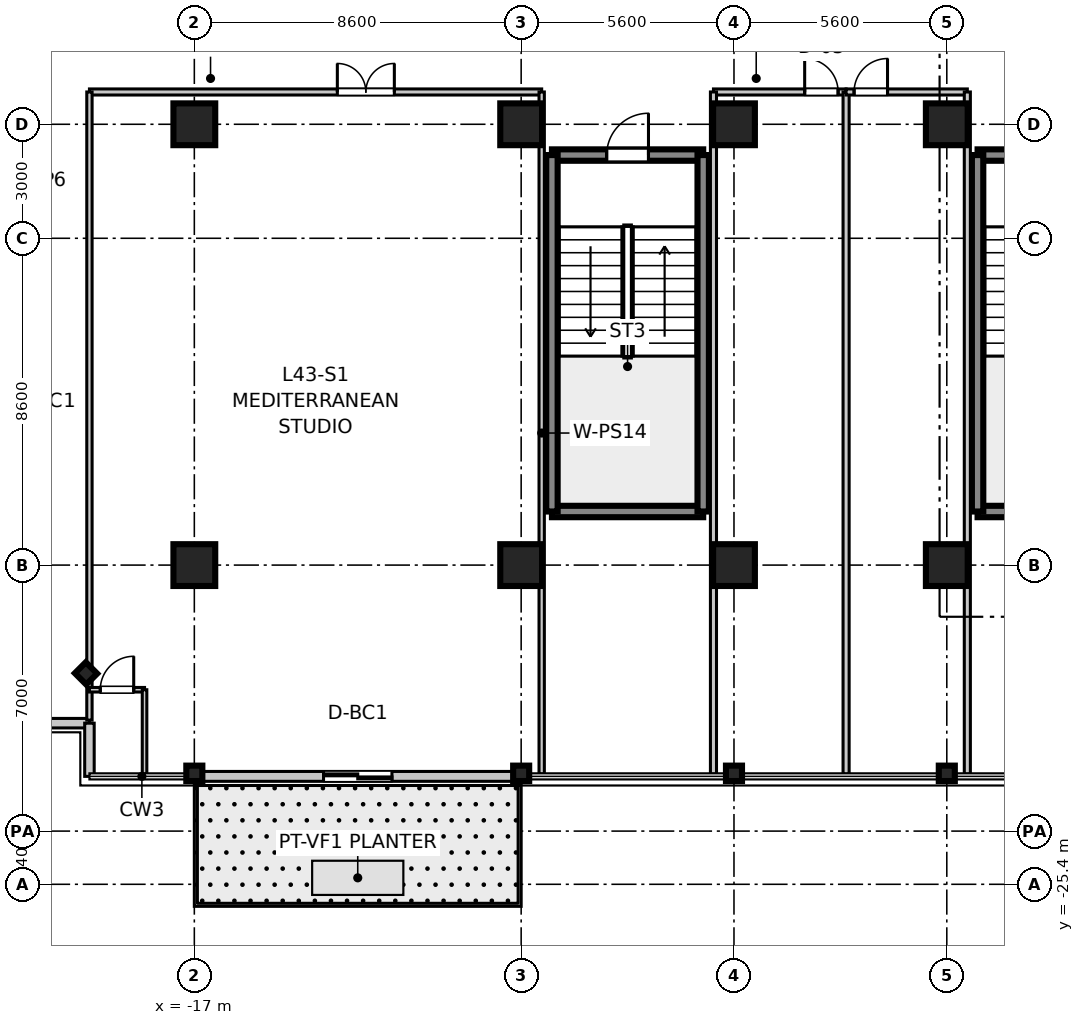
"""IFC4 building model, lengths in metres.
Left out: names, types, materials, properties, quantities, classifications, styles, units other than length and angle.
Written with IfcOpenShell. Run it as: python <this file> out.ifc"""

import sys

from ifc_helpers import new_model, si_unit, direction, frame, frame_2d, origin, origin_2d, place, context, subcontext, project, spatial, rectangle, i_section, extrude, source, transform, mapped, element, fill, save


model = new_model("IFC4")
c1 = context("Model", 3, precision=1e-05, world=origin(), true_north=direction((0.0, 1.0)))
c2 = subcontext(c1, "Body", "Model", "MODEL_VIEW")
j1 = project(units=[si_unit("LENGTHUNIT", "METRE"), si_unit("PLANEANGLEUNIT", "RADIAN")], contexts=[c1])
p1 = place(None, origin())
s1 = spatial("IfcSite", under=j1, at=p1, CompositionType="ELEMENT")
p2 = place(p1, origin())
s2 = spatial("IfcBuilding", under=s1, at=p2, CompositionType="ELEMENT")
p3 = place(p2, frame((0.0, 0.0, 170.9)))
s3 = spatial("IfcBuildingStorey", under=s2, at=p3, CompositionType="ELEMENT", Elevation=170.9)
m1 = source(origin(), c2, "Body", "SweptSolid", [
    extrude(rectangle(XDim=1.1, YDim=1.1, at=origin_2d()), origin(), (0.0, 0.0, 1.0), 3.605),
])
for number, where, z_axis, x_axis in (
    (1, (-17.0, -17.0, 0.0), (0.0, 0.0, 1.0), (1.0, 0.0, 0.0)),
    (2, (-17.0, -5.4, 0.0), (0.0, 0.0, 1.0), (1.0, 0.0, 0.0)),
    (3, (-8.4, -17.0, 0.0), (0.0, 0.0, 1.0), (1.0, 0.0, 0.0)),
    (4, (-8.4, -5.4, 0.0), (0.0, 0.0, 1.0), (1.0, 0.0, 0.0)),
    (5, (-2.8, -17.0, 0.0), (0.0, 0.0, 1.0), (1.0, 0.0, 0.0)),
    (6, (-2.8, -5.4, 0.0), (0.0, 0.0, 1.0), (1.0, 0.0, 0.0)),
    (7, (2.8, -17.0, 0.0), (0.0, 0.0, 1.0), (1.0, 0.0, 0.0)),
    (8, (2.8, -5.4, 0.0), (0.0, 0.0, 1.0), (1.0, 0.0, 0.0)),
):
    element("IfcColumn", number, at=place(p3, frame(where, z_axis=z_axis, x_axis=x_axis)), inside=s3, PredefinedType="COLUMN", context=c2, shape_type="MappedRepresentation", body=[
        mapped(m1, transform((0.0, 0.0, 0.0), scale=1.0)),
    ])
m2 = source(origin(), c2, "Body", "SweptSolid", [
    extrude(i_section(OverallWidth=0.406, OverallDepth=0.422, WebThickness=0.019, FlangeThickness=0.03, at=origin_2d()), origin(), (0.0, 0.0, 1.0), 3.605),
])
for number, where, z_axis, x_axis in (
    (9, (-17.0, -22.48, 0.0), (0.0, 0.0, 1.0), (0.0, 1.0, 0.0)),
    (10, (-8.4, -22.48, 0.0), (0.0, 0.0, 1.0), (0.0, 1.0, 0.0)),
    (11, (-2.8, -22.48, 0.0), (0.0, 0.0, 1.0), (0.0, 1.0, 0.0)),
    (12, (2.8, -22.48, 0.0), (0.0, 0.0, 1.0), (0.0, 1.0, 0.0)),
    (13, (-19.85, -19.85, 0.0), (0.0, 0.0, 1.0), (0.707, 0.707, 0.0)),
):
    element("IfcColumn", number, at=place(p3, frame(where, z_axis=z_axis, x_axis=x_axis)), inside=s3, PredefinedType="COLUMN", context=c2, shape_type="MappedRepresentation", body=[
        mapped(m2, transform((0.0, 0.0, 0.0), scale=1.0)),
    ])
m3 = source(origin(), c2, "Body", "SweptSolid", [
    extrude(rectangle(XDim=3.98, YDim=0.3, at=frame_2d((1.99, 0.0))), origin(), (0.0, 0.0, 1.0), 3.39),
])
for number, where, z_axis, x_axis in (
    (14, (3.61, -15.59, 0.0), (0.0, 0.0, 1.0), (1.0, 0.0, 0.0)),
    (15, (3.61, -6.21, 0.0), (0.0, 0.0, 1.0), (1.0, 0.0, 0.0)),
):
    element("IfcWall", number, at=place(p3, frame(where, z_axis=z_axis, x_axis=x_axis)), inside=s3, PredefinedType="SHEAR", context=c2, shape_type="MappedRepresentation", body=[
        mapped(m3, transform((0.0, 0.0, 0.0), scale=1.0)),
    ])
m4 = source(origin(), c2, "Body", "SweptSolid", [
    extrude(rectangle(XDim=9.38, YDim=0.3, at=frame_2d((4.69, 0.0))), origin(), (0.0, 0.0, 1.0), 3.39),
])
p4 = place(p3, frame((3.61, -15.59, 0.0), z_axis=(0.0, 0.0, 1.0), x_axis=(0.0, 1.0, 0.0)))
e16 = element("IfcWall", 16, at=p4, inside=s3, PredefinedType="SHEAR", context=c2, shape_type="MappedRepresentation", body=[
    mapped(m4, transform((0.0, 0.0, 0.0), scale=1.0)),
])
p5 = place(p3, frame((-7.59, -15.59, 0.0), z_axis=(0.0, 0.0, 1.0), x_axis=(1.0, 0.0, 0.0)))
e17 = element("IfcWall", 17, at=p5, inside=s3, PredefinedType="SHEAR", context=c2, shape_type="MappedRepresentation", body=[
    mapped(m3, transform((0.0, 0.0, 0.0), scale=1.0)),
])
p6 = place(p3, frame((-7.59, -6.21, 0.0), z_axis=(0.0, 0.0, 1.0), x_axis=(1.0, 0.0, 0.0)))
e18 = element("IfcWall", 18, at=p6, inside=s3, PredefinedType="SHEAR", context=c2, shape_type="MappedRepresentation", body=[
    mapped(m3, transform((0.0, 0.0, 0.0), scale=1.0)),
])
p7 = place(p6, frame((1.44, 0.0, 0.0)))
e19 = element("IfcOpeningElement", 19, at=p7, cuts=e18, PredefinedType="OPENING", context=c2, shape_type="SweptSolid", body=[
    extrude(rectangle(XDim=1.1, YDim=2.15, at=frame_2d((0.55, 1.075))), frame((0.0, 0.16, 0.0), z_axis=(0.0, -1.0, 0.0), x_axis=(1.0, 0.0, 0.0)), (0.0, 0.0, 1.0), 0.32),
])
for number, where, z_axis, x_axis in (
    (20, (-7.59, -15.59, 0.0), (0.0, 0.0, 1.0), (0.0, 1.0, 0.0)),
    (21, (-3.61, -15.59, 0.0), (0.0, 0.0, 1.0), (0.0, 1.0, 0.0)),
):
    element("IfcWall", number, at=place(p3, frame(where, z_axis=z_axis, x_axis=x_axis)), inside=s3, PredefinedType="SHEAR", context=c2, shape_type="MappedRepresentation", body=[
        mapped(m4, transform((0.0, 0.0, 0.0), scale=1.0)),
    ])
m5 = source(origin(), c2, "Body", "SweptSolid", [
    extrude(rectangle(XDim=1.4, YDim=0.25, at=frame_2d((0.7, 0.0))), origin(), (0.0, 0.0, 1.0), 3.39),
])
p8 = place(p3, frame((-21.16, -21.16, 0.0), z_axis=(0.0, 0.0, 1.0), x_axis=(1.0, 0.0, 0.0)))
e22 = element("IfcWall", 22, at=p8, inside=s3, PredefinedType="STANDARD", context=c2, shape_type="MappedRepresentation", body=[
    mapped(m5, transform((0.0, 0.0, 0.0), scale=1.0)),
])
m6 = source(origin(), c2, "Body", "SweptSolid", [
    extrude(rectangle(XDim=1.4, YDim=0.25, at=frame_2d((0.7, 0.0))), origin(), (0.0, 0.0, 1.0), 3.39),
])
p9 = place(p3, frame((-19.76, -22.56, 0.0), z_axis=(0.0, 0.0, 1.0), x_axis=(0.0, 1.0, 0.0)))
e23 = element("IfcWall", 23, at=p9, inside=s3, PredefinedType="STANDARD", context=c2, shape_type="MappedRepresentation", body=[
    mapped(m6, transform((0.0, 0.0, 0.0), scale=1.0)),
])
m7 = source(origin(), c2, "Body", "SweptSolid", [
    extrude(rectangle(XDim=8.6, YDim=0.26, at=frame_2d((4.3, 0.0))), origin(), (0.0, 0.0, 1.0), 2.87),
])
p10 = place(p3, frame((-17.0, -22.56, 0.0), z_axis=(0.0, 0.0, 1.0), x_axis=(1.0, 0.0, 0.0)))
e24 = element("IfcWall", 24, at=p10, inside=s3, PredefinedType="STANDARD", context=c2, shape_type="MappedRepresentation", body=[
    mapped(m7, transform((0.0, 0.0, 0.0), scale=1.0)),
])
p11 = place(p10, frame((3.4, 0.0, 0.0)))
e25 = element("IfcOpeningElement", 25, at=p11, cuts=e24, PredefinedType="OPENING", context=c2, shape_type="SweptSolid", body=[
    extrude(rectangle(XDim=1.8, YDim=2.25, at=frame_2d((0.9, 1.125))), frame((0.0, 0.14, 0.0), z_axis=(0.0, -1.0, 0.0), x_axis=(1.0, 0.0, 0.0)), (0.0, 0.0, 1.0), 0.28),
])
m8 = source(origin(), c2, "Body", "SweptSolid", [
    extrude(rectangle(XDim=11.9, YDim=0.16, at=frame_2d((5.95, 0.0))), origin(), (0.0, 0.0, 1.0), 2.73),
])
p12 = place(p3, frame((-19.76, -4.55, 0.0), z_axis=(0.0, 0.0, 1.0), x_axis=(1.0, 0.0, 0.0)))
e26 = element("IfcWall", 26, at=p12, inside=s3, PredefinedType="PARTITIONING", context=c2, shape_type="MappedRepresentation", body=[
    mapped(m8, transform((0.0, 0.0, 0.0), scale=1.0)),
])
p13 = place(p12, frame((6.523, 0.0, 0.0)))
e27 = element("IfcOpeningElement", 27, at=p13, cuts=e26, PredefinedType="OPENING", context=c2, shape_type="SweptSolid", body=[
    extrude(rectangle(XDim=1.5, YDim=2.15, at=frame_2d((0.75, 1.075))), frame((0.0, 0.09, 0.0), z_axis=(0.0, -1.0, 0.0), x_axis=(1.0, 0.0, 0.0)), (0.0, 0.0, 1.0), 0.18),
])
m9 = source(origin(), c2, "Body", "SweptSolid", [
    extrude(rectangle(XDim=16.53, YDim=0.14, at=frame_2d((8.265, 0.0))), origin(), (0.0, 0.0, 1.0), 2.73),
])
p14 = place(p3, frame((-19.76, -21.08, 0.0), z_axis=(0.0, 0.0, 1.0), x_axis=(0.0, 1.0, 0.0)))
e28 = element("IfcWall", 28, at=p14, inside=s3, PredefinedType="PARTITIONING", context=c2, shape_type="MappedRepresentation", body=[
    mapped(m9, transform((0.0, 0.0, 0.0), scale=1.0)),
])
m10 = source(origin(), c2, "Body", "SweptSolid", [
    extrude(rectangle(XDim=17.95, YDim=0.14, at=frame_2d((8.975, 0.0))), origin(), (0.0, 0.0, 1.0), 2.73),
])
p15 = place(p3, frame((-7.86, -22.5, 0.0), z_axis=(0.0, 0.0, 1.0), x_axis=(0.0, 1.0, 0.0)))
e29 = element("IfcWall", 29, at=p15, inside=s3, PredefinedType="PARTITIONING", context=c2, shape_type="MappedRepresentation", body=[
    mapped(m10, transform((0.0, 0.0, 0.0), scale=1.0)),
])
m11 = source(origin(), c2, "Body", "SweptSolid", [
    extrude(rectangle(XDim=1.45, YDim=0.12, at=frame_2d((0.725, 0.0))), origin(), (0.0, 0.0, 1.0), 2.73),
])
p16 = place(p3, frame((-19.76, -20.28, 0.0), z_axis=(0.0, 0.0, 1.0), x_axis=(1.0, 0.0, 0.0)))
e30 = element("IfcWall", 30, at=p16, inside=s3, PredefinedType="PARTITIONING", context=c2, shape_type="MappedRepresentation", body=[
    mapped(m11, transform((0.0, 0.0, 0.0), scale=1.0)),
])
p17 = place(p16, frame((0.285, 0.0, 0.0)))
e31 = element("IfcOpeningElement", 31, at=p17, cuts=e30, PredefinedType="OPENING", context=c2, shape_type="SweptSolid", body=[
    extrude(rectangle(XDim=0.88, YDim=2.1, at=frame_2d((0.44, 1.05))), frame((0.0, 0.07, 0.0), z_axis=(0.0, -1.0, 0.0), x_axis=(1.0, 0.0, 0.0)), (0.0, 0.0, 1.0), 0.14),
])
m12 = source(origin(), c2, "Body", "SweptSolid", [
    extrude(rectangle(XDim=2.22, YDim=0.12, at=frame_2d((1.11, 0.0))), origin(), (0.0, 0.0, 1.0), 2.73),
])
p18 = place(p3, frame((-18.31, -22.5, 0.0), z_axis=(0.0, 0.0, 1.0), x_axis=(0.0, 1.0, 0.0)))
e32 = element("IfcWall", 32, at=p18, inside=s3, PredefinedType="PARTITIONING", context=c2, shape_type="MappedRepresentation", body=[
    mapped(m12, transform((0.0, 0.0, 0.0), scale=1.0)),
])
m13 = source(origin(), c2, "Body", "SweptSolid", [
    extrude(rectangle(XDim=3.49, YDim=0.16, at=frame_2d((1.745, 0.0))), origin(), (0.0, 0.0, 1.0), 2.73),
])
p19 = place(p3, frame((-3.34, -4.55, 0.0), z_axis=(0.0, 0.0, 1.0), x_axis=(1.0, 0.0, 0.0)))
e33 = element("IfcWall", 33, at=p19, inside=s3, PredefinedType="PARTITIONING", context=c2, shape_type="MappedRepresentation", body=[
    mapped(m13, transform((0.0, 0.0, 0.0), scale=1.0)),
])
p20 = place(p19, frame((2.4, 0.0, 0.0)))
e34 = element("IfcOpeningElement", 34, at=p20, cuts=e33, PredefinedType="OPENING", context=c2, shape_type="SweptSolid", body=[
    extrude(rectangle(XDim=0.88, YDim=2.1, at=frame_2d((0.44, 1.05))), frame((0.0, 0.09, 0.0), z_axis=(0.0, -1.0, 0.0), x_axis=(1.0, 0.0, 0.0)), (0.0, 0.0, 1.0), 0.18),
])
m14 = source(origin(), c2, "Body", "SweptSolid", [
    extrude(rectangle(XDim=17.95, YDim=0.16, at=frame_2d((8.975, 0.0))), origin(), (0.0, 0.0, 1.0), 2.73),
])
for number, where, z_axis, x_axis in (
    (35, (-3.34, -22.5, 0.0), (0.0, 0.0, 1.0), (0.0, 1.0, 0.0)),
    (36, (0.15, -22.5, 0.0), (0.0, 0.0, 1.0), (0.0, 1.0, 0.0)),
):
    element("IfcWall", number, at=place(p3, frame(where, z_axis=z_axis, x_axis=x_axis)), inside=s3, PredefinedType="PARTITIONING", context=c2, shape_type="MappedRepresentation", body=[
        mapped(m14, transform((0.0, 0.0, 0.0), scale=1.0)),
    ])
m15 = source(origin(), c2, "Body", "SweptSolid", [
    extrude(rectangle(XDim=3.19, YDim=0.16, at=frame_2d((1.595, 0.0))), origin(), (0.0, 0.0, 1.0), 2.73),
])
p21 = place(p3, frame((0.15, -4.55, 0.0), z_axis=(0.0, 0.0, 1.0), x_axis=(1.0, 0.0, 0.0)))
e37 = element("IfcWall", 37, at=p21, inside=s3, PredefinedType="PARTITIONING", context=c2, shape_type="MappedRepresentation", body=[
    mapped(m15, transform((0.0, 0.0, 0.0), scale=1.0)),
])
p22 = place(p21, frame((0.21, 0.0, 0.0)))
e38 = element("IfcOpeningElement", 38, at=p22, cuts=e37, PredefinedType="OPENING", context=c2, shape_type="SweptSolid", body=[
    extrude(rectangle(XDim=0.88, YDim=2.1, at=frame_2d((0.44, 1.05))), frame((0.0, 0.09, 0.0), z_axis=(0.0, -1.0, 0.0), x_axis=(1.0, 0.0, 0.0)), (0.0, 0.0, 1.0), 0.18),
])
p23 = place(p3, frame((3.34, -22.5, 0.0), z_axis=(0.0, 0.0, 1.0), x_axis=(0.0, 1.0, 0.0)))
e39 = element("IfcWall", 39, at=p23, inside=s3, PredefinedType="PARTITIONING", context=c2, shape_type="MappedRepresentation", body=[
    mapped(m14, transform((0.0, 0.0, 0.0), scale=1.0)),
])
m16 = source(origin(), c2, "Body", "SweptSolid", [
    extrude(rectangle(XDim=1.1, YDim=2.15, at=frame_2d((0.55, 1.075))), frame((0.0, 0.025, 0.0), z_axis=(0.0, -1.0, 0.0), x_axis=(1.0, 0.0, 0.0)), (0.0, 0.0, 1.0), 0.05),
])
p24 = place(p7, frame((1.1, 0.0, 0.0), z_axis=(0.0, 0.0, 1.0), x_axis=(-1.0, 0.0, 0.0)))
e40 = element("IfcDoor", 40, at=p24, inside=s3, OperationType="SINGLE_SWING_RIGHT", PredefinedType="DOOR", context=c2, shape_type="MappedRepresentation", body=[
    mapped(m16, transform((0.0, 0.0, 0.0), scale=1.0)),
])
fill(e19, e40)
m17 = source(origin(), c2, "Body", "SweptSolid", [
    extrude(rectangle(XDim=0.88, YDim=2.1, at=frame_2d((0.44, 1.05))), frame((0.0, 0.025, 0.0), z_axis=(0.0, -1.0, 0.0), x_axis=(1.0, 0.0, 0.0)), (0.0, 0.0, 1.0), 0.05),
])
p25 = place(p17, frame((0.88, 0.0, 0.0), z_axis=(0.0, 0.0, 1.0), x_axis=(-1.0, 0.0, 0.0)))
e41 = element("IfcDoor", 41, at=p25, inside=s3, OperationType="SINGLE_SWING_RIGHT", PredefinedType="DOOR", context=c2, shape_type="MappedRepresentation", body=[
    mapped(m17, transform((0.0, 0.0, 0.0), scale=1.0)),
])
fill(e31, e41)
m18 = source(origin(), c2, "Body", "SweptSolid", [
    extrude(rectangle(XDim=1.5, YDim=2.15, at=frame_2d((0.75, 1.075))), frame((0.0, 0.025, 0.0), z_axis=(0.0, -1.0, 0.0), x_axis=(1.0, 0.0, 0.0)), (0.0, 0.0, 1.0), 0.05),
])
p26 = place(p13, frame((1.5, 0.0, 0.0), z_axis=(0.0, 0.0, 1.0), x_axis=(-1.0, 0.0, 0.0)))
e42 = element("IfcDoor", 42, at=p26, inside=s3, OperationType="DOUBLE_DOOR_SINGLE_SWING", PredefinedType="DOOR", context=c2, shape_type="MappedRepresentation", body=[
    mapped(m18, transform((0.0, 0.0, 0.0), scale=1.0)),
])
fill(e27, e42)
p27 = place(p20, frame((0.88, 0.0, 0.0), z_axis=(0.0, 0.0, 1.0), x_axis=(-1.0, 0.0, 0.0)))
e43 = element("IfcDoor", 43, at=p27, inside=s3, OperationType="SINGLE_SWING_LEFT", PredefinedType="DOOR", context=c2, shape_type="MappedRepresentation", body=[
    mapped(m17, transform((0.0, 0.0, 0.0), scale=1.0)),
])
fill(e34, e43)
p28 = place(p22, frame((0.88, 0.0, 0.0), z_axis=(0.0, 0.0, 1.0), x_axis=(-1.0, 0.0, 0.0)))
e44 = element("IfcDoor", 44, at=p28, inside=s3, OperationType="SINGLE_SWING_RIGHT", PredefinedType="DOOR", context=c2, shape_type="MappedRepresentation", body=[
    mapped(m17, transform((0.0, 0.0, 0.0), scale=1.0)),
])
fill(e38, e44)
m19 = source(origin(), c2, "Body", "SweptSolid", [
    extrude(rectangle(XDim=1.8, YDim=2.25, at=frame_2d((0.9, 1.125))), frame((0.0, 0.025, 0.0), z_axis=(0.0, -1.0, 0.0), x_axis=(1.0, 0.0, 0.0)), (0.0, 0.0, 1.0), 0.05),
])
p29 = place(p11, frame((1.8, 0.0, 0.0), z_axis=(0.0, 0.0, 1.0), x_axis=(-1.0, 0.0, 0.0)))
e45 = element("IfcDoor", 45, at=p29, inside=s3, OperationType="DOUBLE_DOOR_SLIDING", PredefinedType="DOOR", context=c2, shape_type="MappedRepresentation", body=[
    mapped(m19, transform((0.0, 0.0, 0.0), scale=1.0)),
])
fill(e25, e45)
save(model, sys.argv[1])
